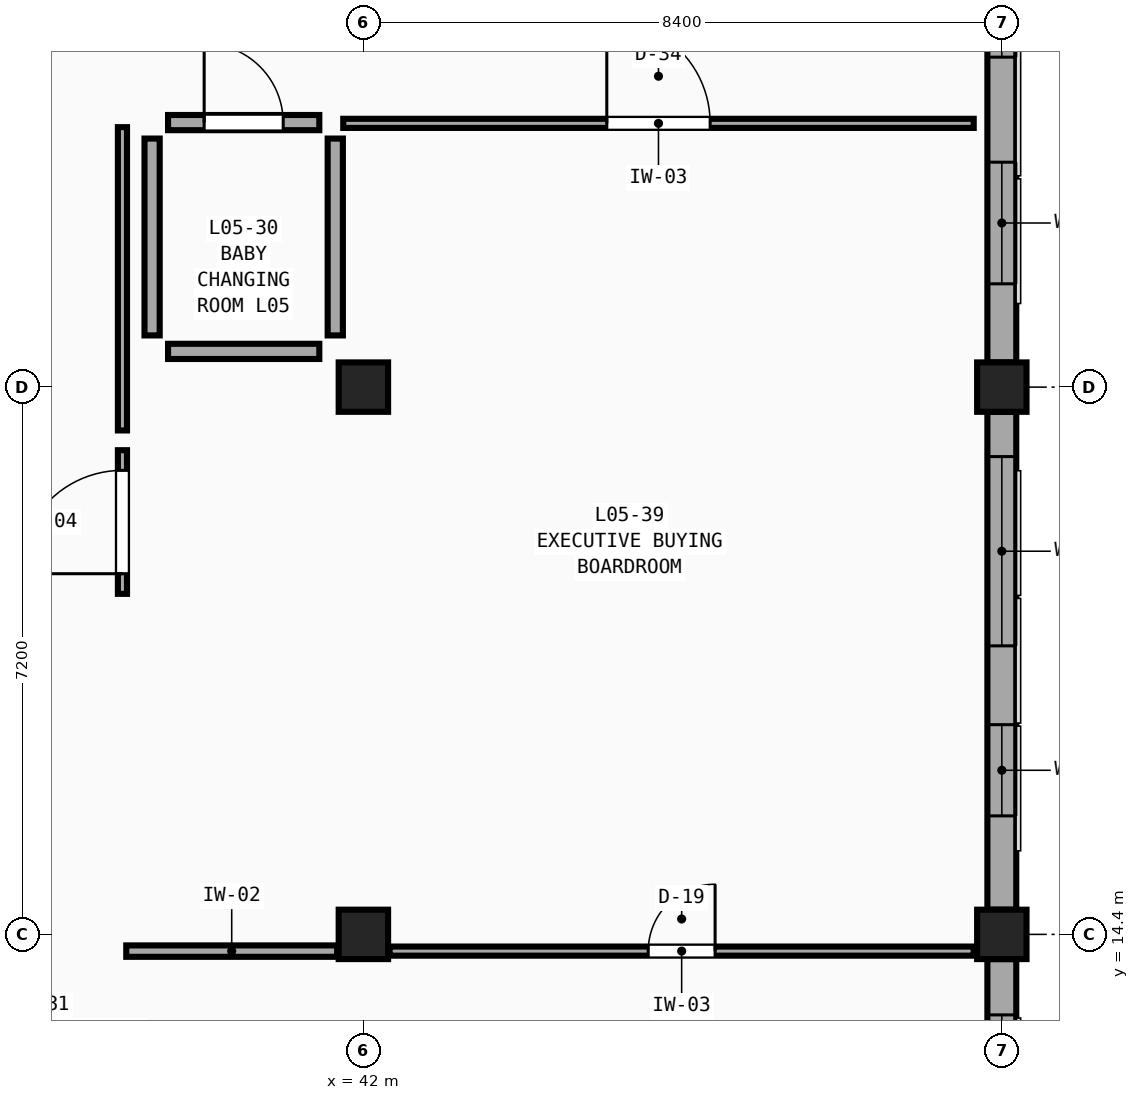
"""IFC4 building model, lengths in metres.
Left out: names, types, materials, properties, quantities, classifications, styles, units other than length and angle.
Written with IfcOpenShell. Run it as: python <this file> out.ifc"""

import sys

from ifc_helpers import new_model, si_unit, direction, frame, frame_2d, origin, origin_2d, place, context, subcontext, project, spatial, rectangle, extrude, element, fill, save


model = new_model("IFC4")
c1 = context("Model", 3, precision=1e-05, world=origin(), true_north=direction((0.0, 1.0)))
c2 = subcontext(c1, "Body", "Model", "MODEL_VIEW")
j1 = project(units=[si_unit("LENGTHUNIT", "METRE"), si_unit("PLANEANGLEUNIT", "RADIAN")], contexts=[c1])
p1 = place(None, origin())
s1 = spatial("IfcSite", under=j1, at=p1, CompositionType="ELEMENT")
p2 = place(p1, origin())
s2 = spatial("IfcBuilding", under=s1, at=p2, CompositionType="ELEMENT")
p3 = place(p2, frame((0.0, 0.0, 23.4)))
s3 = spatial("IfcBuildingStorey", under=s2, at=p3, CompositionType="ELEMENT", Elevation=23.4)
for number, where, z_axis, x_axis in (
    (1, (42.0, 14.4, 0.0), (0.0, 0.0, 1.0), (1.0, 0.0, 0.0)),
    (2, (42.0, 21.6, 0.0), (0.0, 0.0, 1.0), (1.0, 0.0, 0.0)),
    (3, (50.4, 14.4, 0.0), (0.0, 0.0, 1.0), (1.0, 0.0, 0.0)),
    (4, (50.4, 21.6, 0.0), (0.0, 0.0, 1.0), (1.0, 0.0, 0.0)),
):
    element("IfcColumn", number, at=place(p3, frame(where, z_axis=z_axis, x_axis=x_axis)), inside=s3, PredefinedType="COLUMN", context=c2, shape_type="SweptSolid", body=[
        extrude(rectangle(XDim=0.65, YDim=0.65, at=origin_2d()), origin(), (0.0, 0.0, 1.0), 4.5),
    ])
p4 = place(p3, frame((50.4, 14.075, 0.0), z_axis=(0.0, 0.0, 1.0), x_axis=(0.0, -1.0, 0.0)))
e5 = element("IfcWall", 5, at=p4, inside=s3, PredefinedType="SOLIDWALL", context=c2, shape_type="SweptSolid", body=[
    extrude(rectangle(XDim=6.55, YDim=0.38, at=frame_2d((3.275, 0.0))), origin(), (0.0, 0.0, 1.0), 3.66),
])
p5 = place(p4, frame((0.734, 0.0, 0.75)))
e6 = element("IfcOpeningElement", 6, at=p5, cuts=e5, PredefinedType="OPENING", context=c2, shape_type="SweptSolid", body=[
    extrude(rectangle(XDim=2.2, YDim=2.62, at=frame_2d((1.1, 1.31))), frame((0.0, 0.21, 0.0), z_axis=(0.0, -1.0, 0.0), x_axis=(1.0, 0.0, 0.0)), (0.0, 0.0, 1.0), 0.42),
])
p6 = place(p4, frame((3.516, 0.0, 0.75)))
e7 = element("IfcOpeningElement", 7, at=p6, cuts=e5, PredefinedType="OPENING", context=c2, shape_type="SweptSolid", body=[
    extrude(rectangle(XDim=2.4, YDim=2.62, at=frame_2d((1.2, 1.31))), frame((0.0, 0.21, 0.0), z_axis=(0.0, -1.0, 0.0), x_axis=(1.0, 0.0, 0.0)), (0.0, 0.0, 1.0), 0.42),
])
p7 = place(p3, frame((50.4, 21.275, 0.0), z_axis=(0.0, 0.0, 1.0), x_axis=(0.0, -1.0, 0.0)))
e8 = element("IfcWall", 8, at=p7, inside=s3, PredefinedType="SOLIDWALL", context=c2, shape_type="SweptSolid", body=[
    extrude(rectangle(XDim=6.55, YDim=0.38, at=frame_2d((3.275, 0.0))), origin(), (0.0, 0.0, 1.0), 3.66),
])
p8 = place(p7, frame((0.589, 0.0, 0.75)))
e9 = element("IfcOpeningElement", 9, at=p8, cuts=e8, PredefinedType="OPENING", context=c2, shape_type="SweptSolid", body=[
    extrude(rectangle(XDim=2.49, YDim=2.62, at=frame_2d((1.245, 1.31))), frame((0.0, 0.21, 0.0), z_axis=(0.0, -1.0, 0.0), x_axis=(1.0, 0.0, 0.0)), (0.0, 0.0, 1.0), 0.42),
])
p9 = place(p7, frame((4.116, 0.0, 0.75)))
e10 = element("IfcOpeningElement", 10, at=p9, cuts=e8, PredefinedType="OPENING", context=c2, shape_type="SweptSolid", body=[
    extrude(rectangle(XDim=1.2, YDim=2.76, at=frame_2d((0.6, 1.38))), frame((0.0, 0.21, 0.0), z_axis=(0.0, -1.0, 0.0), x_axis=(1.0, 0.0, 0.0)), (0.0, 0.0, 1.0), 0.42),
])
p10 = place(p3, frame((50.4, 28.475, 0.0), z_axis=(0.0, 0.0, 1.0), x_axis=(0.0, -1.0, 0.0)))
e11 = element("IfcWall", 11, at=p10, inside=s3, PredefinedType="SOLIDWALL", context=c2, shape_type="SweptSolid", body=[
    extrude(rectangle(XDim=6.55, YDim=0.38, at=frame_2d((3.275, 0.0))), origin(), (0.0, 0.0, 1.0), 3.66),
])
p11 = place(p10, frame((1.134, 0.0, 0.75)))
e12 = element("IfcOpeningElement", 12, at=p11, cuts=e11, PredefinedType="OPENING", context=c2, shape_type="SweptSolid", body=[
    extrude(rectangle(XDim=1.4, YDim=2.76, at=frame_2d((0.7, 1.38))), frame((0.0, 0.21, 0.0), z_axis=(0.0, -1.0, 0.0), x_axis=(1.0, 0.0, 0.0)), (0.0, 0.0, 1.0), 0.42),
])
p12 = place(p10, frame((3.916, 0.0, 0.75)))
e13 = element("IfcOpeningElement", 13, at=p12, cuts=e11, PredefinedType="OPENING", context=c2, shape_type="SweptSolid", body=[
    extrude(rectangle(XDim=1.6, YDim=2.76, at=frame_2d((0.8, 1.38))), frame((0.0, 0.21, 0.0), z_axis=(0.0, -1.0, 0.0), x_axis=(1.0, 0.0, 0.0)), (0.0, 0.0, 1.0), 0.42),
])
p13 = place(p3, frame((38.88, 14.18, 0.0), z_axis=(0.0, 0.0, 1.0), x_axis=(1.0, 0.0, 0.0)))
e14 = element("IfcWall", 14, at=p13, inside=s3, PredefinedType="PARTITIONING", context=c2, shape_type="SweptSolid", body=[
    extrude(rectangle(XDim=2.775, YDim=0.15, at=frame_2d((1.388, 0.0))), origin(), (0.0, 0.0, 1.0), 3.76),
])
p14 = place(p3, frame((42.345, 14.18, 0.0), z_axis=(0.0, 0.0, 1.0), x_axis=(1.0, 0.0, 0.0)))
e15 = element("IfcWall", 15, at=p14, inside=s3, PredefinedType="PARTITIONING", context=c2, shape_type="SweptSolid", body=[
    extrude(rectangle(XDim=7.685, YDim=0.12, at=frame_2d((3.843, 0.0))), origin(), (0.0, 0.0, 1.0), 3.76),
])
p15 = place(p14, frame((3.403, 0.0, 0.0)))
e16 = element("IfcOpeningElement", 16, at=p15, cuts=e15, PredefinedType="OPENING", context=c2, shape_type="SweptSolid", body=[
    extrude(rectangle(XDim=0.88, YDim=2.29, at=frame_2d((0.44, 1.145))), frame((0.0, 0.08, 0.0), z_axis=(0.0, -1.0, 0.0), x_axis=(1.0, 0.0, 0.0)), (0.0, 0.0, 1.0), 0.16),
])
p16 = place(p3, frame((41.735, 25.07, 0.0), z_axis=(0.0, 0.0, 1.0), x_axis=(1.0, 0.0, 0.0)))
e17 = element("IfcWall", 17, at=p16, inside=s3, PredefinedType="PARTITIONING", context=c2, shape_type="SweptSolid", body=[
    extrude(rectangle(XDim=8.295, YDim=0.12, at=frame_2d((4.147, 0.0))), origin(), (0.0, 0.0, 1.0), 4.21),
])
p17 = place(p16, frame((3.468, 0.0, 0.0)))
e18 = element("IfcOpeningElement", 18, at=p17, cuts=e17, PredefinedType="OPENING", context=c2, shape_type="SweptSolid", body=[
    extrude(rectangle(XDim=1.36, YDim=2.45, at=frame_2d((0.68, 1.225))), frame((0.0, 0.08, 0.0), z_axis=(0.0, -1.0, 0.0), x_axis=(1.0, 0.0, 0.0)), (0.0, 0.0, 1.0), 0.16),
])
p18 = place(p3, frame((38.83, 21.03, 0.0), z_axis=(0.0, 0.0, 1.0), x_axis=(0.0, 1.0, 0.0)))
e19 = element("IfcWall", 19, at=p18, inside=s3, PredefinedType="PARTITIONING", context=c2, shape_type="SweptSolid", body=[
    extrude(rectangle(XDim=3.99, YDim=0.12, at=frame_2d((1.995, 0.0))), origin(), (0.0, 0.0, 1.0), 4.21),
])
p19 = place(p3, frame((39.43, 25.08, 0.0), z_axis=(0.0, 0.0, 1.0), x_axis=(1.0, 0.0, 0.0)))
e20 = element("IfcWall", 20, at=p19, inside=s3, PredefinedType="PLUMBINGWALL", context=c2, shape_type="SweptSolid", body=[
    extrude(rectangle(XDim=1.99, YDim=0.2, at=frame_2d((0.995, 0.0))), origin(), (0.0, 0.0, 1.0), 4.21),
])
p20 = place(p19, frame((0.475, 0.0, 0.0)))
e21 = element("IfcOpeningElement", 21, at=p20, cuts=e20, PredefinedType="OPENING", context=c2, shape_type="SweptSolid", body=[
    extrude(rectangle(XDim=1.04, YDim=2.05, at=frame_2d((0.52, 1.025))), frame((0.0, 0.12, 0.0), z_axis=(0.0, -1.0, 0.0), x_axis=(1.0, 0.0, 0.0)), (0.0, 0.0, 1.0), 0.24),
])
p21 = place(p3, frame((38.83, 18.88, 0.0), z_axis=(0.0, 0.0, 1.0), x_axis=(0.0, 1.0, 0.0)))
e22 = element("IfcWall", 22, at=p21, inside=s3, PredefinedType="PARTITIONING", context=c2, shape_type="SweptSolid", body=[
    extrude(rectangle(XDim=1.89, YDim=0.12, at=frame_2d((0.945, 0.0))), origin(), (0.0, 0.0, 1.0), 4.21),
])
p22 = place(p21, frame((0.265, 0.0, 0.0)))
e23 = element("IfcOpeningElement", 23, at=p22, cuts=e22, PredefinedType="OPENING", context=c2, shape_type="SweptSolid", body=[
    extrude(rectangle(XDim=1.36, YDim=2.05, at=frame_2d((0.68, 1.025))), frame((0.0, 0.08, 0.0), z_axis=(0.0, -1.0, 0.0), x_axis=(1.0, 0.0, 0.0)), (0.0, 0.0, 1.0), 0.16),
])
p23 = place(p3, frame((41.63, 22.28, 0.0), z_axis=(0.0, 0.0, 1.0), x_axis=(0.0, 1.0, 0.0)))
e24 = element("IfcWall", 24, at=p23, inside=s3, PredefinedType="PLUMBINGWALL", context=c2, shape_type="SweptSolid", body=[
    extrude(rectangle(XDim=2.59, YDim=0.2, at=frame_2d((1.295, 0.0))), origin(), (0.0, 0.0, 1.0), 3.76),
])
p24 = place(p3, frame((39.22, 22.28, 0.0), z_axis=(0.0, 0.0, 1.0), x_axis=(0.0, 1.0, 0.0)))
e25 = element("IfcWall", 25, at=p24, inside=s3, PredefinedType="PLUMBINGWALL", context=c2, shape_type="SweptSolid", body=[
    extrude(rectangle(XDim=2.59, YDim=0.2, at=frame_2d((1.295, 0.0))), origin(), (0.0, 0.0, 1.0), 4.21),
])
p25 = place(p3, frame((39.43, 22.07, 0.0), z_axis=(0.0, 0.0, 1.0), x_axis=(1.0, 0.0, 0.0)))
e26 = element("IfcWall", 26, at=p25, inside=s3, PredefinedType="PLUMBINGWALL", context=c2, shape_type="SweptSolid", body=[
    extrude(rectangle(XDim=1.99, YDim=0.2, at=frame_2d((0.995, 0.0))), origin(), (0.0, 0.0, 1.0), 3.76),
])
p26 = place(p5, origin())
e27 = element("IfcWindow", 27, at=p26, inside=s3, PartitioningType="TRIPLE_PANEL_VERTICAL", PredefinedType="WINDOW", context=c2, shape_type="SweptSolid", body=[
    extrude(rectangle(XDim=2.2, YDim=2.62, at=frame_2d((1.1, 1.31))), frame((0.0, 0.03, 0.0), z_axis=(0.0, -1.0, 0.0), x_axis=(1.0, 0.0, 0.0)), (0.0, 0.0, 1.0), 0.06),
])
fill(e6, e27)
p27 = place(p8, origin())
e28 = element("IfcWindow", 28, at=p27, inside=s3, PartitioningType="TRIPLE_PANEL_VERTICAL", PredefinedType="WINDOW", context=c2, shape_type="SweptSolid", body=[
    extrude(rectangle(XDim=2.49, YDim=2.62, at=frame_2d((1.245, 1.31))), frame((0.0, 0.03, 0.0), z_axis=(0.0, -1.0, 0.0), x_axis=(1.0, 0.0, 0.0)), (0.0, 0.0, 1.0), 0.06),
])
fill(e9, e28)
p28 = place(p9, origin())
e29 = element("IfcWindow", 29, at=p28, inside=s3, PartitioningType="SINGLE_PANEL", PredefinedType="WINDOW", context=c2, shape_type="SweptSolid", body=[
    extrude(rectangle(XDim=1.2, YDim=2.76, at=frame_2d((0.6, 1.38))), frame((0.0, 0.03, 0.0), z_axis=(0.0, -1.0, 0.0), x_axis=(1.0, 0.0, 0.0)), (0.0, 0.0, 1.0), 0.06),
])
fill(e10, e29)
p29 = place(p11, origin())
e30 = element("IfcWindow", 30, at=p29, inside=s3, PartitioningType="DOUBLE_PANEL_VERTICAL", PredefinedType="WINDOW", context=c2, shape_type="SweptSolid", body=[
    extrude(rectangle(XDim=1.4, YDim=2.76, at=frame_2d((0.7, 1.38))), frame((0.0, 0.03, 0.0), z_axis=(0.0, -1.0, 0.0), x_axis=(1.0, 0.0, 0.0)), (0.0, 0.0, 1.0), 0.06),
])
fill(e12, e30)
p30 = place(p12, origin())
e31 = element("IfcWindow", 31, at=p30, inside=s3, PartitioningType="DOUBLE_PANEL_VERTICAL", PredefinedType="WINDOW", context=c2, shape_type="SweptSolid", body=[
    extrude(rectangle(XDim=1.6, YDim=2.76, at=frame_2d((0.8, 1.38))), frame((0.0, 0.03, 0.0), z_axis=(0.0, -1.0, 0.0), x_axis=(1.0, 0.0, 0.0)), (0.0, 0.0, 1.0), 0.06),
])
fill(e13, e31)
p31 = place(p15, origin())
e32 = element("IfcDoor", 32, at=p31, inside=s3, OperationType="SINGLE_SWING_RIGHT", PredefinedType="DOOR", context=c2, shape_type="SweptSolid", body=[
    extrude(rectangle(XDim=0.88, YDim=2.29, at=frame_2d((0.44, 1.145))), frame((0.0, 0.025, 0.0), z_axis=(0.0, -1.0, 0.0), x_axis=(1.0, 0.0, 0.0)), (0.0, 0.0, 1.0), 0.05),
])
fill(e16, e32)
p32 = place(p17, origin())
e33 = element("IfcDoor", 33, at=p32, inside=s3, OperationType="SINGLE_SWING_LEFT", PredefinedType="DOOR", context=c2, shape_type="SweptSolid", body=[
    extrude(rectangle(XDim=1.36, YDim=2.45, at=frame_2d((0.68, 1.225))), frame((0.0, 0.025, 0.0), z_axis=(0.0, -1.0, 0.0), x_axis=(1.0, 0.0, 0.0)), (0.0, 0.0, 1.0), 0.05),
])
fill(e18, e33)
p33 = place(p20, origin())
e34 = element("IfcDoor", 34, at=p33, inside=s3, OperationType="SINGLE_SWING_LEFT", PredefinedType="DOOR", context=c2, shape_type="SweptSolid", body=[
    extrude(rectangle(XDim=1.04, YDim=2.05, at=frame_2d((0.52, 1.025))), frame((0.0, 0.025, 0.0), z_axis=(0.0, -1.0, 0.0), x_axis=(1.0, 0.0, 0.0)), (0.0, 0.0, 1.0), 0.05),
])
fill(e21, e34)
p34 = place(p22, origin())
e35 = element("IfcDoor", 35, at=p34, inside=s3, OperationType="SINGLE_SWING_LEFT", PredefinedType="DOOR", context=c2, shape_type="SweptSolid", body=[
    extrude(rectangle(XDim=1.36, YDim=2.05, at=frame_2d((0.68, 1.025))), frame((0.0, 0.025, 0.0), z_axis=(0.0, -1.0, 0.0), x_axis=(1.0, 0.0, 0.0)), (0.0, 0.0, 1.0), 0.05),
])
fill(e23, e35)
save(model, sys.argv[1])
